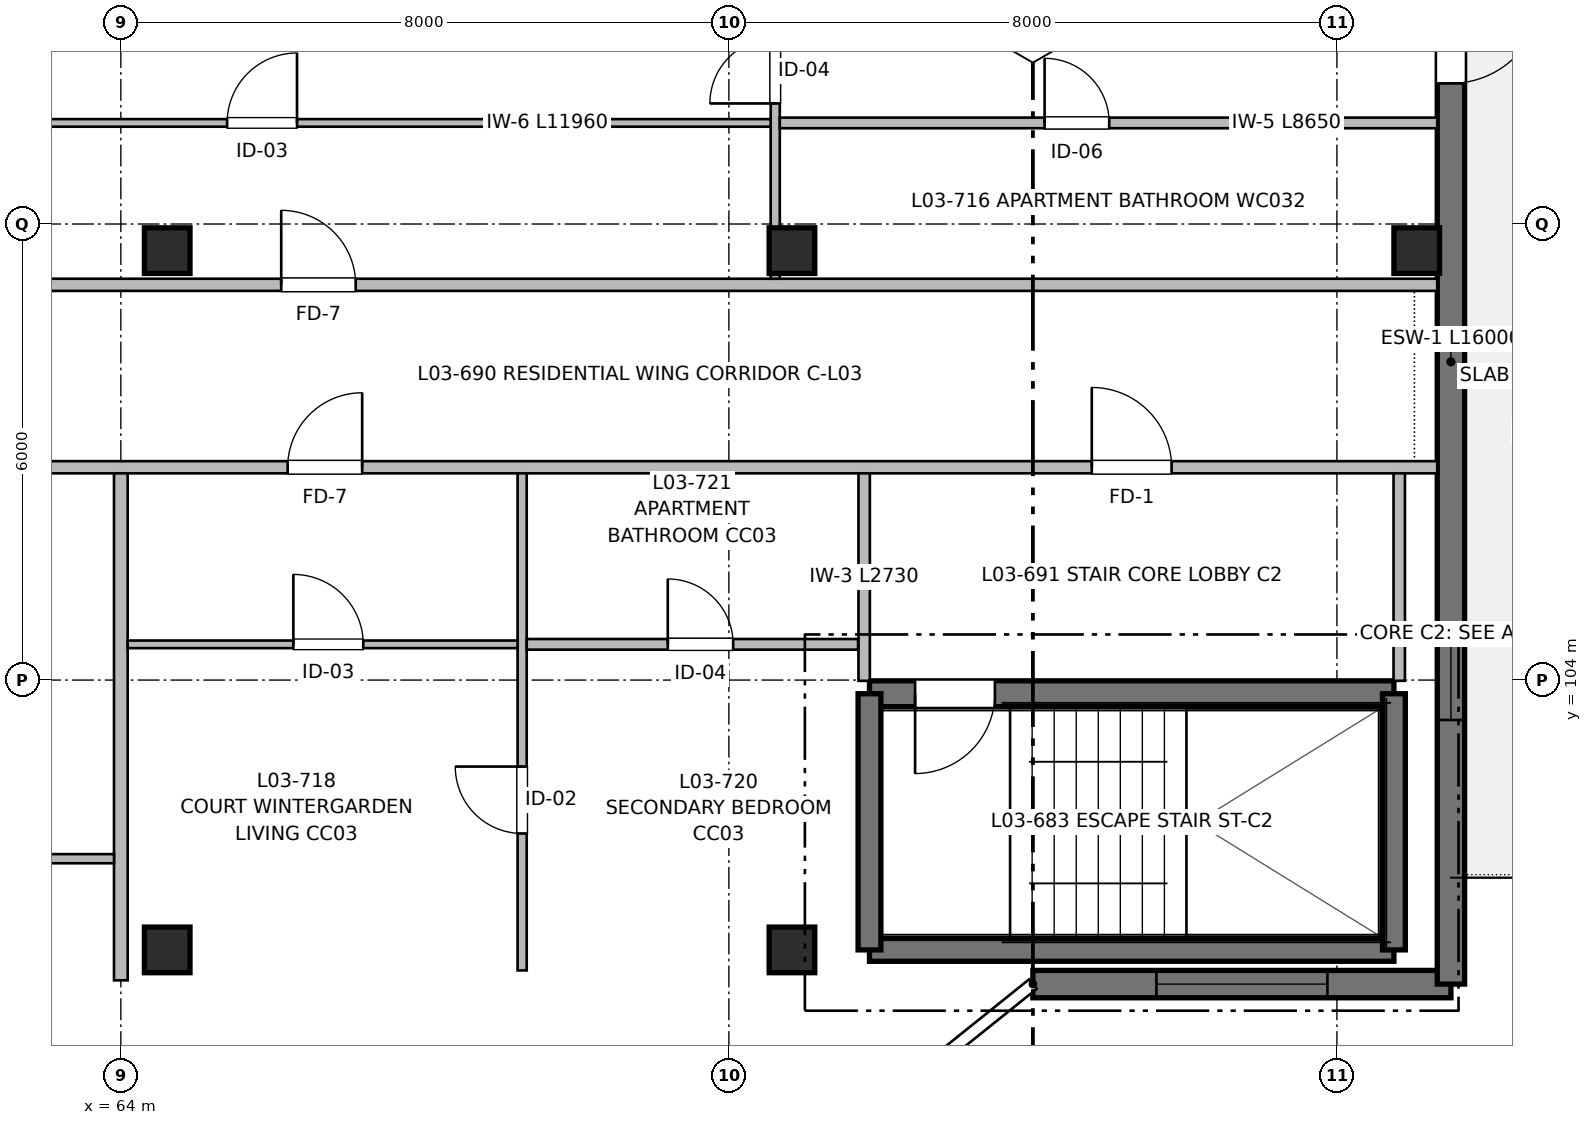
"""IFC4 building model, lengths in metres.
Left out: names, types, materials, properties, quantities, classifications, styles, units other than length and angle.
Written with IfcOpenShell. Run it as: python <this file> out.ifc"""

import sys

from ifc_helpers import new_model, si_unit, direction, frame, frame_2d, origin, origin_2d, place, context, subcontext, project, spatial, rectangle, extrude, element, fill, save


model = new_model("IFC4")
c1 = context("Model", 3, precision=1e-05, world=origin(), true_north=direction((0.0, 1.0)))
c2 = subcontext(c1, "Body", "Model", "MODEL_VIEW")
j1 = project(units=[si_unit("LENGTHUNIT", "METRE"), si_unit("PLANEANGLEUNIT", "RADIAN")], contexts=[c1])
p1 = place(None, origin())
s1 = spatial("IfcSite", under=j1, at=p1, CompositionType="ELEMENT")
p2 = place(p1, origin())
s2 = spatial("IfcBuilding", under=s1, at=p2, CompositionType="ELEMENT")
p3 = place(p2, frame((0.0, 0.0, 10.56)))
s3 = spatial("IfcBuildingStorey", under=s2, at=p3, CompositionType="ELEMENT", Elevation=10.56)
for number, where, z_axis, x_axis in (
    (1, (64.61, 100.45, 0.0), (0.0, 0.0, 1.0), (1.0, 0.0, 0.0)),
    (2, (64.61, 109.65, 0.0), (0.0, 0.0, 1.0), (1.0, 0.0, 0.0)),
    (3, (72.83, 100.45, 0.0), (0.0, 0.0, 1.0), (1.0, 0.0, 0.0)),
    (4, (72.83, 109.65, 0.0), (0.0, 0.0, 1.0), (1.0, 0.0, 0.0)),
    (5, (81.05, 109.65, 0.0), (0.0, 0.0, 1.0), (1.0, 0.0, 0.0)),
):
    element("IfcColumn", number, at=place(p3, frame(where, z_axis=z_axis, x_axis=x_axis)), inside=s3, PredefinedType="COLUMN", context=c2, shape_type="SweptSolid", body=[
        extrude(rectangle(XDim=0.6, YDim=0.6, at=origin_2d()), origin(), (0.0, 0.0, 1.0), 3.2),
    ])
p4 = place(p3, frame((73.85, 100.45, 0.0), z_axis=(0.0, 0.0, 1.0), x_axis=(1.0, 0.0, 0.0)))
e6 = element("IfcWall", 6, at=p4, inside=s3, PredefinedType="SHEAR", context=c2, shape_type="SweptSolid", body=[
    extrude(rectangle(XDim=6.9, YDim=0.3, at=frame_2d((3.45, 0.0))), origin(), (0.0, 0.0, 1.0), 3.2),
])
p5 = place(p3, frame((80.75, 103.82, 0.0), z_axis=(0.0, 0.0, 1.0), x_axis=(-1.0, 0.0, 0.0)))
e7 = element("IfcWall", 7, at=p5, inside=s3, PredefinedType="SHEAR", context=c2, shape_type="SweptSolid", body=[
    extrude(rectangle(XDim=6.9, YDim=0.34, at=frame_2d((3.45, 0.0))), origin(), (0.0, 0.0, 1.0), 3.2),
])
p6 = place(p5, frame((5.25, 0.0, 0.0)))
e8 = element("IfcOpeningElement", 8, at=p6, cuts=e7, PredefinedType="OPENING", context=c2, shape_type="SweptSolid", body=[
    extrude(rectangle(XDim=1.05, YDim=2.15, at=frame_2d((0.525, 1.075))), frame((0.0, 0.18, 0.0), z_axis=(0.0, -1.0, 0.0), x_axis=(1.0, 0.0, 0.0)), (0.0, 0.0, 1.0), 0.36),
])
for number, where, z_axis, x_axis in (
    (9, (73.85, 103.82, 0.0), (0.0, 0.0, 1.0), (0.0, -1.0, 0.0)),
    (10, (80.75, 100.45, 0.0), (0.0, 0.0, 1.0), (0.0, 1.0, 0.0)),
):
    element("IfcWall", number, at=place(p3, frame(where, z_axis=z_axis, x_axis=x_axis)), inside=s3, PredefinedType="SHEAR", context=c2, shape_type="SweptSolid", body=[
        extrude(rectangle(XDim=3.37, YDim=0.3, at=frame_2d((1.685, 0.0))), origin(), (0.0, 0.0, 1.0), 3.2),
    ])
p7 = place(p3, frame((81.5, 100.0, 0.0), z_axis=(0.0, 0.0, 1.0), x_axis=(-1.0, 0.0, 0.0)))
e11 = element("IfcWall", 11, at=p7, inside=s3, PredefinedType="SHEAR", context=c2, shape_type="SweptSolid", body=[
    extrude(rectangle(XDim=5.5, YDim=0.36, at=frame_2d((2.75, 0.0))), origin(), (0.0, 0.0, 1.0), 2.98),
])
p8 = place(p7, frame((1.625, 0.0, 0.72)))
e12 = element("IfcOpeningElement", 12, at=p8, cuts=e11, PredefinedType="OPENING", context=c2, shape_type="SweptSolid", body=[
    extrude(rectangle(XDim=2.25, YDim=1.5, at=frame_2d((1.125, 0.75))), frame((0.0, 0.19, 0.0), z_axis=(0.0, -1.0, 0.0), x_axis=(1.0, 0.0, 0.0)), (0.0, 0.0, 1.0), 0.38),
])
p9 = place(p3, frame((81.5, 116.0, 0.0), z_axis=(0.0, 0.0, 1.0), x_axis=(0.0, -1.0, 0.0)))
e13 = element("IfcWall", 13, at=p9, inside=s3, PredefinedType="SHEAR", context=c2, shape_type="SweptSolid", body=[
    extrude(rectangle(XDim=16.0, YDim=0.36, at=frame_2d((8.0, 0.0))), origin(), (0.0, 0.0, 1.0), 2.98),
])
p10 = place(p9, frame((2.95, 0.0, 0.0)))
e14 = element("IfcOpeningElement", 14, at=p10, cuts=e13, PredefinedType="OPENING", context=c2, shape_type="SweptSolid", body=[
    extrude(rectangle(XDim=1.2, YDim=2.2, at=frame_2d((0.6, 1.1))), frame((0.0, 0.19, 0.0), z_axis=(0.0, -1.0, 0.0), x_axis=(1.0, 0.0, 0.0)), (0.0, 0.0, 1.0), 0.38),
])
p11 = place(p9, frame((11.475, 0.0, 0.9)))
e15 = element("IfcOpeningElement", 15, at=p11, cuts=e13, PredefinedType="OPENING", context=c2, shape_type="SweptSolid", body=[
    extrude(rectangle(XDim=1.05, YDim=1.15, at=frame_2d((0.525, 0.575))), frame((0.0, 0.19, 0.0), z_axis=(0.0, -1.0, 0.0), x_axis=(1.0, 0.0, 0.0)), (0.0, 0.0, 1.0), 0.38),
])
p12 = place(p3, frame((57.2, 106.8, 0.0), z_axis=(0.0, 0.0, 1.0), x_axis=(1.0, 0.0, 0.0)))
e16 = element("IfcWall", 16, at=p12, inside=s3, PredefinedType="PARTITIONING", context=c2, shape_type="SweptSolid", body=[
    extrude(rectangle(XDim=24.12, YDim=0.16, at=frame_2d((12.06, 0.0))), origin(), (0.0, 0.0, 1.0), 2.935),
])
p13 = place(p12, frame((19.575, 0.0, 0.0)))
e17 = element("IfcOpeningElement", 17, at=p13, cuts=e16, PredefinedType="OPENING", context=c2, shape_type="SweptSolid", body=[
    extrude(rectangle(XDim=1.05, YDim=2.15, at=frame_2d((0.525, 1.075))), frame((0.0, 0.09, 0.0), z_axis=(0.0, -1.0, 0.0), x_axis=(1.0, 0.0, 0.0)), (0.0, 0.0, 1.0), 0.18),
])
p14 = place(p12, frame((8.995, 0.0, 0.0)))
e18 = element("IfcOpeningElement", 18, at=p14, cuts=e16, PredefinedType="OPENING", context=c2, shape_type="SweptSolid", body=[
    extrude(rectangle(XDim=0.98, YDim=2.15, at=frame_2d((0.49, 1.075))), frame((0.0, 0.09, 0.0), z_axis=(0.0, -1.0, 0.0), x_axis=(1.0, 0.0, 0.0)), (0.0, 0.0, 1.0), 0.18),
])
p15 = place(p3, frame((39.68, 109.2, 0.0), z_axis=(0.0, 0.0, 1.0), x_axis=(1.0, 0.0, 0.0)))
e19 = element("IfcWall", 19, at=p15, inside=s3, PredefinedType="PARTITIONING", context=c2, shape_type="SweptSolid", body=[
    extrude(rectangle(XDim=41.64, YDim=0.16, at=frame_2d((20.82, 0.0))), origin(), (0.0, 0.0, 1.0), 2.935),
])
p16 = place(p15, frame((5.52, 0.0, 0.0)))
e20 = element("IfcOpeningElement", 20, at=p16, cuts=e19, PredefinedType="OPENING", context=c2, shape_type="SweptSolid", body=[
    extrude(rectangle(XDim=0.98, YDim=2.15, at=frame_2d((0.49, 1.075))), frame((0.0, 0.09, 0.0), z_axis=(0.0, -1.0, 0.0), x_axis=(1.0, 0.0, 0.0)), (0.0, 0.0, 1.0), 0.18),
])
p17 = place(p15, frame((26.43, 0.0, 0.0)))
e21 = element("IfcOpeningElement", 21, at=p17, cuts=e19, PredefinedType="OPENING", context=c2, shape_type="SweptSolid", body=[
    extrude(rectangle(XDim=0.98, YDim=2.15, at=frame_2d((0.49, 1.075))), frame((0.0, 0.09, 0.0), z_axis=(0.0, -1.0, 0.0), x_axis=(1.0, 0.0, 0.0)), (0.0, 0.0, 1.0), 0.18),
])
p18 = place(p3, frame((64.0, 100.05, 0.0), z_axis=(0.0, 0.0, 1.0), x_axis=(0.0, 1.0, 0.0)))
e22 = element("IfcWall", 22, at=p18, inside=s3, PredefinedType="PARTITIONING", context=c2, shape_type="SweptSolid", body=[
    extrude(rectangle(XDim=6.67, YDim=0.18, at=frame_2d((3.335, 0.0))), origin(), (0.0, 0.0, 1.0), 2.935),
])
for number, where, z_axis, x_axis in (
    (23, (73.78, 103.99, 0.0), (0.0, 0.0, 1.0), (0.0, 1.0, 0.0)),
    (24, (80.82, 103.99, 0.0), (0.0, 0.0, 1.0), (0.0, 1.0, 0.0)),
):
    element("IfcWall", number, at=place(p3, frame(where, z_axis=z_axis, x_axis=x_axis)), inside=s3, PredefinedType="PARTITIONING", context=c2, shape_type="SweptSolid", body=[
        extrude(rectangle(XDim=2.73, YDim=0.15, at=frame_2d((1.365, 0.0))), origin(), (0.0, 0.0, 1.0), 2.935),
    ])
p19 = place(p3, frame((59.72, 101.65, 0.0), z_axis=(0.0, 0.0, 1.0), x_axis=(1.0, 0.0, 0.0)))
e25 = element("IfcWall", 25, at=p19, inside=s3, PredefinedType="PARTITIONING", context=c2, shape_type="SweptSolid", body=[
    extrude(rectangle(XDim=4.19, YDim=0.12, at=frame_2d((2.095, 0.0))), origin(), (0.0, 0.0, 1.0), 2.935),
])
p20 = place(p19, frame((1.645, 0.0, 0.0)))
e26 = element("IfcOpeningElement", 26, at=p20, cuts=e25, PredefinedType="OPENING", context=c2, shape_type="SweptSolid", body=[
    extrude(rectangle(XDim=0.9, YDim=2.1, at=frame_2d((0.45, 1.05))), frame((0.0, 0.07, 0.0), z_axis=(0.0, -1.0, 0.0), x_axis=(1.0, 0.0, 0.0)), (0.0, 0.0, 1.0), 0.14),
])
p21 = place(p3, frame((72.61, 109.28, 0.0), z_axis=(0.0, 0.0, 1.0), x_axis=(0.0, 1.0, 0.0)))
e27 = element("IfcWall", 27, at=p21, inside=s3, PredefinedType="PARTITIONING", context=c2, shape_type="SweptSolid", body=[
    extrude(rectangle(XDim=6.59, YDim=0.12, at=frame_2d((3.295, 0.0))), origin(), (0.0, 0.0, 1.0), 2.935),
])
p22 = place(p21, frame((2.306, 0.0, 0.0)))
e28 = element("IfcOpeningElement", 28, at=p22, cuts=e27, PredefinedType="OPENING", context=c2, shape_type="SweptSolid", body=[
    extrude(rectangle(XDim=0.86, YDim=2.1, at=frame_2d((0.43, 1.05))), frame((0.0, 0.07, 0.0), z_axis=(0.0, -1.0, 0.0), x_axis=(1.0, 0.0, 0.0)), (0.0, 0.0, 1.0), 0.14),
])
p23 = place(p21, frame((4.093, 0.0, 0.0)))
e29 = element("IfcOpeningElement", 29, at=p23, cuts=e27, PredefinedType="OPENING", context=c2, shape_type="SweptSolid", body=[
    extrude(rectangle(XDim=0.9, YDim=2.1, at=frame_2d((0.45, 1.05))), frame((0.0, 0.07, 0.0), z_axis=(0.0, -1.0, 0.0), x_axis=(1.0, 0.0, 0.0)), (0.0, 0.0, 1.0), 0.14),
])
p24 = place(p3, frame((72.67, 111.33, 0.0), z_axis=(0.0, 0.0, 1.0), x_axis=(1.0, 0.0, 0.0)))
e30 = element("IfcWall", 30, at=p24, inside=s3, PredefinedType="PARTITIONING", context=c2, shape_type="SweptSolid", body=[
    extrude(rectangle(XDim=8.65, YDim=0.14, at=frame_2d((4.325, 0.0))), origin(), (0.0, 0.0, 1.0), 2.935),
])
p25 = place(p24, frame((3.484, 0.0, 0.0)))
e31 = element("IfcOpeningElement", 31, at=p25, cuts=e30, PredefinedType="OPENING", context=c2, shape_type="SweptSolid", body=[
    extrude(rectangle(XDim=0.85, YDim=2.05, at=frame_2d((0.425, 1.025))), frame((0.0, 0.08, 0.0), z_axis=(0.0, -1.0, 0.0), x_axis=(1.0, 0.0, 0.0)), (0.0, 0.0, 1.0), 0.16),
])
p26 = place(p3, frame((60.59, 111.33, 0.0), z_axis=(0.0, 0.0, 1.0), x_axis=(1.0, 0.0, 0.0)))
e32 = element("IfcWall", 32, at=p26, inside=s3, PredefinedType="PARTITIONING", context=c2, shape_type="SweptSolid", body=[
    extrude(rectangle(XDim=11.96, YDim=0.1, at=frame_2d((5.98, 0.0))), origin(), (0.0, 0.0, 1.0), 2.935),
])
p27 = place(p26, frame((4.808, 0.0, 0.0)))
e33 = element("IfcOpeningElement", 33, at=p27, cuts=e32, PredefinedType="OPENING", context=c2, shape_type="SweptSolid", body=[
    extrude(rectangle(XDim=0.92, YDim=2.1, at=frame_2d((0.46, 1.05))), frame((0.0, 0.06, 0.0), z_axis=(0.0, -1.0, 0.0), x_axis=(1.0, 0.0, 0.0)), (0.0, 0.0, 1.0), 0.12),
])
p28 = place(p3, frame((69.28, 100.18, 0.0), z_axis=(0.0, 0.0, 1.0), x_axis=(0.0, 1.0, 0.0)))
e34 = element("IfcWall", 34, at=p28, inside=s3, PredefinedType="PARTITIONING", context=c2, shape_type="SweptSolid", body=[
    extrude(rectangle(XDim=6.54, YDim=0.12, at=frame_2d((3.27, 0.0))), origin(), (0.0, 0.0, 1.0), 2.935),
])
p29 = place(p28, frame((1.802, 0.0, 0.0)))
e35 = element("IfcOpeningElement", 35, at=p29, cuts=e34, PredefinedType="OPENING", context=c2, shape_type="SweptSolid", body=[
    extrude(rectangle(XDim=0.88, YDim=2.1, at=frame_2d((0.44, 1.05))), frame((0.0, 0.07, 0.0), z_axis=(0.0, -1.0, 0.0), x_axis=(1.0, 0.0, 0.0)), (0.0, 0.0, 1.0), 0.14),
])
p30 = place(p3, frame((69.34, 104.47, 0.0), z_axis=(0.0, 0.0, 1.0), x_axis=(1.0, 0.0, 0.0)))
e36 = element("IfcWall", 36, at=p30, inside=s3, PredefinedType="PARTITIONING", context=c2, shape_type="SweptSolid", body=[
    extrude(rectangle(XDim=4.36, YDim=0.14, at=frame_2d((2.18, 0.0))), origin(), (0.0, 0.0, 1.0), 2.935),
])
p31 = place(p30, frame((1.856, 0.0, 0.0)))
e37 = element("IfcOpeningElement", 37, at=p31, cuts=e36, PredefinedType="OPENING", context=c2, shape_type="SweptSolid", body=[
    extrude(rectangle(XDim=0.86, YDim=2.1, at=frame_2d((0.43, 1.05))), frame((0.0, 0.08, 0.0), z_axis=(0.0, -1.0, 0.0), x_axis=(1.0, 0.0, 0.0)), (0.0, 0.0, 1.0), 0.16),
])
p32 = place(p3, frame((64.09, 104.47, 0.0), z_axis=(0.0, 0.0, 1.0), x_axis=(1.0, 0.0, 0.0)))
e38 = element("IfcWall", 38, at=p32, inside=s3, PredefinedType="PARTITIONING", context=c2, shape_type="SweptSolid", body=[
    extrude(rectangle(XDim=5.13, YDim=0.1, at=frame_2d((2.565, 0.0))), origin(), (0.0, 0.0, 1.0), 2.935),
])
p33 = place(p32, frame((2.18, 0.0, 0.0)))
e39 = element("IfcOpeningElement", 39, at=p33, cuts=e38, PredefinedType="OPENING", context=c2, shape_type="SweptSolid", body=[
    extrude(rectangle(XDim=0.92, YDim=2.1, at=frame_2d((0.46, 1.05))), frame((0.0, 0.06, 0.0), z_axis=(0.0, -1.0, 0.0), x_axis=(1.0, 0.0, 0.0)), (0.0, 0.0, 1.0), 0.12),
])
p34 = place(p6, origin())
e40 = element("IfcDoor", 40, at=p34, inside=s3, OperationType="SINGLE_SWING_RIGHT", PredefinedType="DOOR", context=c2, shape_type="SweptSolid", body=[
    extrude(rectangle(XDim=1.05, YDim=2.15, at=frame_2d((0.525, 1.075))), frame((0.0, 0.025, 0.0), z_axis=(0.0, -1.0, 0.0), x_axis=(1.0, 0.0, 0.0)), (0.0, 0.0, 1.0), 0.05),
])
fill(e8, e40)
p35 = place(p8, origin())
e41 = element("IfcWindow", 41, at=p35, inside=s3, PartitioningType="SINGLE_PANEL", PredefinedType="WINDOW", context=c2, shape_type="SweptSolid", body=[
    extrude(rectangle(XDim=2.25, YDim=1.5, at=frame_2d((1.125, 0.75))), frame((0.0, 0.03, 0.0), z_axis=(0.0, -1.0, 0.0), x_axis=(1.0, 0.0, 0.0)), (0.0, 0.0, 1.0), 0.06),
])
fill(e12, e41)
p36 = place(p10, origin())
e42 = element("IfcDoor", 42, at=p36, inside=s3, OperationType="SINGLE_SWING_LEFT", PredefinedType="DOOR", context=c2, shape_type="SweptSolid", body=[
    extrude(rectangle(XDim=1.2, YDim=2.2, at=frame_2d((0.6, 1.1))), frame((0.0, 0.025, 0.0), z_axis=(0.0, -1.0, 0.0), x_axis=(1.0, 0.0, 0.0)), (0.0, 0.0, 1.0), 0.05),
])
fill(e14, e42)
p37 = place(p11, origin())
e43 = element("IfcWindow", 43, at=p37, inside=s3, PartitioningType="SINGLE_PANEL", PredefinedType="WINDOW", context=c2, shape_type="SweptSolid", body=[
    extrude(rectangle(XDim=1.05, YDim=1.15, at=frame_2d((0.525, 0.575))), frame((0.0, 0.03, 0.0), z_axis=(0.0, -1.0, 0.0), x_axis=(1.0, 0.0, 0.0)), (0.0, 0.0, 1.0), 0.06),
])
fill(e15, e43)
p38 = place(p13, origin())
e44 = element("IfcDoor", 44, at=p38, inside=s3, OperationType="SINGLE_SWING_LEFT", PredefinedType="DOOR", context=c2, shape_type="SweptSolid", body=[
    extrude(rectangle(XDim=1.05, YDim=2.15, at=frame_2d((0.525, 1.075))), frame((0.0, 0.025, 0.0), z_axis=(0.0, -1.0, 0.0), x_axis=(1.0, 0.0, 0.0)), (0.0, 0.0, 1.0), 0.05),
])
fill(e17, e44)
p39 = place(p17, origin())
e45 = element("IfcDoor", 45, at=p39, inside=s3, OperationType="SINGLE_SWING_LEFT", PredefinedType="DOOR", context=c2, shape_type="SweptSolid", body=[
    extrude(rectangle(XDim=0.98, YDim=2.15, at=frame_2d((0.49, 1.075))), frame((0.0, 0.025, 0.0), z_axis=(0.0, -1.0, 0.0), x_axis=(1.0, 0.0, 0.0)), (0.0, 0.0, 1.0), 0.05),
])
fill(e21, e45)
p40 = place(p27, origin())
e46 = element("IfcDoor", 46, at=p40, inside=s3, OperationType="SINGLE_SWING_RIGHT", PredefinedType="DOOR", context=c2, shape_type="SweptSolid", body=[
    extrude(rectangle(XDim=0.92, YDim=2.1, at=frame_2d((0.46, 1.05))), frame((0.0, 0.025, 0.0), z_axis=(0.0, -1.0, 0.0), x_axis=(1.0, 0.0, 0.0)), (0.0, 0.0, 1.0), 0.05),
])
fill(e33, e46)
p41 = place(p22, origin())
e47 = element("IfcDoor", 47, at=p41, inside=s3, OperationType="SINGLE_SWING_LEFT", PredefinedType="DOOR", context=c2, shape_type="SweptSolid", body=[
    extrude(rectangle(XDim=0.86, YDim=2.1, at=frame_2d((0.43, 1.05))), frame((0.0, 0.025, 0.0), z_axis=(0.0, -1.0, 0.0), x_axis=(1.0, 0.0, 0.0)), (0.0, 0.0, 1.0), 0.05),
])
fill(e28, e47)
p42 = place(p25, origin())
e48 = element("IfcDoor", 48, at=p42, inside=s3, OperationType="SINGLE_SWING_LEFT", PredefinedType="DOOR", context=c2, shape_type="SweptSolid", body=[
    extrude(rectangle(XDim=0.85, YDim=2.05, at=frame_2d((0.425, 1.025))), frame((0.0, 0.025, 0.0), z_axis=(0.0, -1.0, 0.0), x_axis=(1.0, 0.0, 0.0)), (0.0, 0.0, 1.0), 0.05),
])
fill(e31, e48)
p43 = place(p14, origin())
e49 = element("IfcDoor", 49, at=p43, inside=s3, OperationType="SINGLE_SWING_RIGHT", PredefinedType="DOOR", context=c2, shape_type="SweptSolid", body=[
    extrude(rectangle(XDim=0.98, YDim=2.15, at=frame_2d((0.49, 1.075))), frame((0.0, 0.025, 0.0), z_axis=(0.0, -1.0, 0.0), x_axis=(1.0, 0.0, 0.0)), (0.0, 0.0, 1.0), 0.05),
])
fill(e18, e49)
p44 = place(p33, origin())
e50 = element("IfcDoor", 50, at=p44, inside=s3, OperationType="SINGLE_SWING_LEFT", PredefinedType="DOOR", context=c2, shape_type="SweptSolid", body=[
    extrude(rectangle(XDim=0.92, YDim=2.1, at=frame_2d((0.46, 1.05))), frame((0.0, 0.025, 0.0), z_axis=(0.0, -1.0, 0.0), x_axis=(1.0, 0.0, 0.0)), (0.0, 0.0, 1.0), 0.05),
])
fill(e39, e50)
p45 = place(p29, origin())
e51 = element("IfcDoor", 51, at=p45, inside=s3, OperationType="SINGLE_SWING_RIGHT", PredefinedType="DOOR", context=c2, shape_type="SweptSolid", body=[
    extrude(rectangle(XDim=0.88, YDim=2.1, at=frame_2d((0.44, 1.05))), frame((0.0, 0.025, 0.0), z_axis=(0.0, -1.0, 0.0), x_axis=(1.0, 0.0, 0.0)), (0.0, 0.0, 1.0), 0.05),
])
fill(e35, e51)
p46 = place(p31, origin())
e52 = element("IfcDoor", 52, at=p46, inside=s3, OperationType="SINGLE_SWING_LEFT", PredefinedType="DOOR", context=c2, shape_type="SweptSolid", body=[
    extrude(rectangle(XDim=0.86, YDim=2.1, at=frame_2d((0.43, 1.05))), frame((0.0, 0.025, 0.0), z_axis=(0.0, -1.0, 0.0), x_axis=(1.0, 0.0, 0.0)), (0.0, 0.0, 1.0), 0.05),
])
fill(e37, e52)
save(model, sys.argv[1])
